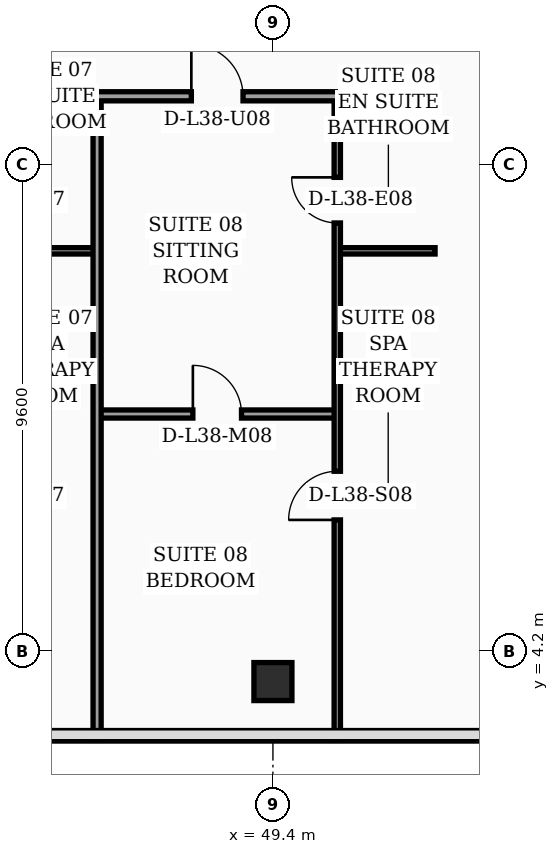
"""IFC4 building model, lengths in metres.
Left out: names, types, materials, properties, quantities, classifications, styles, units other than length and angle.
Written with IfcOpenShell. Run it as: python <this file> out.ifc"""

import sys

from ifc_helpers import new_model, si_unit, direction, frame, frame_2d, origin, origin_2d, place, context, subcontext, project, spatial, rectangle, hollow_rectangle, extrude, element, fill, save


model = new_model("IFC4")
c1 = context("Model", 3, precision=1e-05, world=origin(), true_north=direction((0.0, 1.0)))
c2 = subcontext(c1, "Body", "Model", "MODEL_VIEW")
j1 = project(units=[si_unit("LENGTHUNIT", "METRE"), si_unit("PLANEANGLEUNIT", "RADIAN")], contexts=[c1])
p1 = place(None, origin())
s1 = spatial("IfcSite", under=j1, at=p1, CompositionType="ELEMENT")
p2 = place(p1, origin())
s2 = spatial("IfcBuilding", under=s1, at=p2, CompositionType="ELEMENT")
p3 = place(p2, frame((0.0, 0.0, 156.1)))
s3 = spatial("IfcBuildingStorey", under=s2, at=p3, CompositionType="ELEMENT", Elevation=156.1)
p4 = place(p3, frame((49.4, 3.6, 0.0), z_axis=(0.0, 0.0, 1.0), x_axis=(1.0, 0.0, 0.0)))
e1 = element("IfcColumn", 1, at=p4, inside=s3, PredefinedType="COLUMN", context=c2, shape_type="SweptSolid", body=[
    extrude(hollow_rectangle(XDim=0.75, YDim=0.75, WallThickness=0.032, at=origin_2d()), origin(), (0.0, 0.0, 1.0), 3.56),
])
p5 = place(p3, frame((59.23, 5.505, 0.0), z_axis=(0.0, 0.0, 1.0), x_axis=(-0.300509063924, 0.953778958931, 0.0)))
e2 = element("IfcWall", 2, at=p5, inside=s3, PredefinedType="SOLIDWALL", context=c2, shape_type="SweptSolid", body=[
    extrude(rectangle(XDim=30.814, YDim=0.32, at=frame_2d((15.407, 0.0))), origin(), (0.0, 0.0, 1.0), 3.56),
])
p6 = place(p5, frame((10.199, 0.0, 0.0)))
e3 = element("IfcOpeningElement", 3, at=p6, cuts=e2, PredefinedType="OPENING", context=c2, shape_type="SweptSolid", body=[
    extrude(rectangle(XDim=1.4, YDim=2.25, at=frame_2d((0.7, 1.125))), frame((0.0, 0.17, 0.0), z_axis=(0.0, -1.0, 0.0), x_axis=(1.0, 0.0, 0.0)), (0.0, 0.0, 1.0), 0.34),
])
p7 = place(p5, frame((1.6, 0.0, 0.75)))
e4 = element("IfcOpeningElement", 4, at=p7, cuts=e2, PredefinedType="OPENING", context=c2, shape_type="SweptSolid", body=[
    extrude(rectangle(XDim=1.5, YDim=1.6, at=frame_2d((0.75, 0.8))), frame((0.0, 0.17, 0.0), z_axis=(0.0, -1.0, 0.0), x_axis=(1.0, 0.0, 0.0)), (0.0, 0.0, 1.0), 0.34),
])
p8 = place(p5, frame((4.7, 0.0, 0.75)))
e5 = element("IfcOpeningElement", 5, at=p8, cuts=e2, PredefinedType="OPENING", context=c2, shape_type="SweptSolid", body=[
    extrude(rectangle(XDim=1.5, YDim=1.6, at=frame_2d((0.75, 0.8))), frame((0.0, 0.17, 0.0), z_axis=(0.0, -1.0, 0.0), x_axis=(1.0, 0.0, 0.0)), (0.0, 0.0, 1.0), 0.34),
])
p9 = place(p5, frame((7.8, 0.0, 0.75)))
e6 = element("IfcOpeningElement", 6, at=p9, cuts=e2, PredefinedType="OPENING", context=c2, shape_type="SweptSolid", body=[
    extrude(rectangle(XDim=1.5, YDim=1.6, at=frame_2d((0.75, 0.8))), frame((0.0, 0.17, 0.0), z_axis=(0.0, -1.0, 0.0), x_axis=(1.0, 0.0, 0.0)), (0.0, 0.0, 1.0), 0.34),
])
p10 = place(p5, frame((14.0, 0.0, 0.75)))
e7 = element("IfcOpeningElement", 7, at=p10, cuts=e2, PredefinedType="OPENING", context=c2, shape_type="SweptSolid", body=[
    extrude(rectangle(XDim=1.5, YDim=1.6, at=frame_2d((0.75, 0.8))), frame((0.0, 0.17, 0.0), z_axis=(0.0, -1.0, 0.0), x_axis=(1.0, 0.0, 0.0)), (0.0, 0.0, 1.0), 0.34),
])
p11 = place(p5, frame((17.1, 0.0, 0.75)))
e8 = element("IfcOpeningElement", 8, at=p11, cuts=e2, PredefinedType="OPENING", context=c2, shape_type="SweptSolid", body=[
    extrude(rectangle(XDim=1.5, YDim=1.6, at=frame_2d((0.75, 0.8))), frame((0.0, 0.17, 0.0), z_axis=(0.0, -1.0, 0.0), x_axis=(1.0, 0.0, 0.0)), (0.0, 0.0, 1.0), 0.34),
])
p12 = place(p5, frame((20.2, 0.0, 0.75)))
e9 = element("IfcOpeningElement", 9, at=p12, cuts=e2, PredefinedType="OPENING", context=c2, shape_type="SweptSolid", body=[
    extrude(rectangle(XDim=1.5, YDim=1.6, at=frame_2d((0.75, 0.8))), frame((0.0, 0.17, 0.0), z_axis=(0.0, -1.0, 0.0), x_axis=(1.0, 0.0, 0.0)), (0.0, 0.0, 1.0), 0.34),
])
p13 = place(p5, frame((23.3, 0.0, 0.75)))
e10 = element("IfcOpeningElement", 10, at=p13, cuts=e2, PredefinedType="OPENING", context=c2, shape_type="SweptSolid", body=[
    extrude(rectangle(XDim=1.5, YDim=1.6, at=frame_2d((0.75, 0.8))), frame((0.0, 0.17, 0.0), z_axis=(0.0, -1.0, 0.0), x_axis=(1.0, 0.0, 0.0)), (0.0, 0.0, 1.0), 0.34),
])
p14 = place(p5, frame((26.4, 0.0, 0.75)))
e11 = element("IfcOpeningElement", 11, at=p14, cuts=e2, PredefinedType="OPENING", context=c2, shape_type="SweptSolid", body=[
    extrude(rectangle(XDim=1.5, YDim=1.6, at=frame_2d((0.75, 0.8))), frame((0.0, 0.17, 0.0), z_axis=(0.0, -1.0, 0.0), x_axis=(1.0, 0.0, 0.0)), (0.0, 0.0, 1.0), 0.34),
])
p15 = place(p3, frame((43.8, 12.1, 0.0), z_axis=(0.0, 0.0, 1.0), x_axis=(1.0, 0.0, 0.0)))
e12 = element("IfcWall", 12, at=p15, inside=s3, PredefinedType="PARTITIONING", context=c2, shape_type="SweptSolid", body=[
    extrude(rectangle(XDim=2.13, YDim=0.125, at=frame_2d((1.065, 0.0))), origin(), (0.0, 0.0, 1.0), 3.56),
])
p16 = place(p3, frame((50.67, 12.1, 0.0), z_axis=(0.0, 0.0, 1.0), x_axis=(1.0, 0.0, 0.0)))
e13 = element("IfcWall", 13, at=p16, inside=s3, PredefinedType="PARTITIONING", context=c2, shape_type="SweptSolid", body=[
    extrude(rectangle(XDim=1.93, YDim=0.125, at=frame_2d((0.965, 0.0))), origin(), (0.0, 0.0, 1.0), 3.56),
])
p17 = place(p3, frame((45.93, 8.88, 0.0), z_axis=(0.0, 0.0, 1.0), x_axis=(1.0, 0.0, 0.0)))
e14 = element("IfcWall", 14, at=p17, inside=s3, PredefinedType="PARTITIONING", context=c2, shape_type="SweptSolid", body=[
    extrude(rectangle(XDim=4.74, YDim=0.16, at=frame_2d((2.37, 0.0))), origin(), (0.0, 0.0, 1.0), 2.94),
])
p18 = place(p17, frame((1.89, 0.0, 0.0)))
e15 = element("IfcOpeningElement", 15, at=p18, cuts=e14, PredefinedType="OPENING", context=c2, shape_type="SweptSolid", body=[
    extrude(rectangle(XDim=0.96, YDim=2.2, at=frame_2d((0.48, 1.1))), frame((0.0, 0.09, 0.0), z_axis=(0.0, -1.0, 0.0), x_axis=(1.0, 0.0, 0.0)), (0.0, 0.0, 1.0), 0.18),
])
p19 = place(p3, frame((50.67, 2.44, 0.0), z_axis=(0.0, 0.0, 1.0), x_axis=(0.0, 1.0, 0.0)))
e16 = element("IfcWall", 16, at=p19, inside=s3, PredefinedType="PARTITIONING", context=c2, shape_type="SweptSolid", body=[
    extrude(rectangle(XDim=12.71, YDim=0.125, at=frame_2d((6.355, 0.0))), origin(), (0.0, 0.0, 1.0), 3.04),
])
p20 = place(p19, frame((4.35, 0.0, 0.0)))
e17 = element("IfcOpeningElement", 17, at=p20, cuts=e16, PredefinedType="OPENING", context=c2, shape_type="SweptSolid", body=[
    extrude(rectangle(XDim=0.96, YDim=2.2, at=frame_2d((0.48, 1.1))), frame((0.0, 0.073, 0.0), z_axis=(0.0, -1.0, 0.0), x_axis=(1.0, 0.0, 0.0)), (0.0, 0.0, 1.0), 0.145),
])
p21 = place(p19, frame((10.21, 0.0, 0.0)))
e18 = element("IfcOpeningElement", 18, at=p21, cuts=e16, PredefinedType="OPENING", context=c2, shape_type="SweptSolid", body=[
    extrude(rectangle(XDim=0.9, YDim=2.15, at=frame_2d((0.45, 1.075))), frame((0.0, 0.073, 0.0), z_axis=(0.0, -1.0, 0.0), x_axis=(1.0, 0.0, 0.0)), (0.0, 0.0, 1.0), 0.145),
])
p22 = place(p3, frame((45.93, 2.44, 0.0), z_axis=(0.0, 0.0, 1.0), x_axis=(0.0, 1.0, 0.0)))
e19 = element("IfcWall", 19, at=p22, inside=s3, PredefinedType="PARTITIONING", context=c2, shape_type="SweptSolid", body=[
    extrude(rectangle(XDim=12.71, YDim=0.16, at=frame_2d((6.355, 0.0))), origin(), (0.0, 0.0, 1.0), 3.04),
])
p23 = place(p3, frame((32.4, 15.15, 0.0), z_axis=(0.0, 0.0, 1.0), x_axis=(1.0, 0.0, 0.0)))
e20 = element("IfcWall", 20, at=p23, inside=s3, PredefinedType="PARTITIONING", context=c2, shape_type="SweptSolid", body=[
    extrude(rectangle(XDim=20.2, YDim=0.18, at=frame_2d((10.1, 0.0))), origin(), (0.0, 0.0, 1.0), 2.94),
])
p24 = place(p23, frame((1.64, 0.0, 0.0)))
e21 = element("IfcOpeningElement", 21, at=p24, cuts=e20, PredefinedType="OPENING", context=c2, shape_type="SweptSolid", body=[
    extrude(rectangle(XDim=1.02, YDim=2.2, at=frame_2d((0.51, 1.1))), frame((0.0, 0.1, 0.0), z_axis=(0.0, -1.0, 0.0), x_axis=(1.0, 0.0, 0.0)), (0.0, 0.0, 1.0), 0.2),
])
p25 = place(p23, frame((8.2, 0.0, 0.0)))
e22 = element("IfcOpeningElement", 22, at=p25, cuts=e20, PredefinedType="OPENING", context=c2, shape_type="SweptSolid", body=[
    extrude(rectangle(XDim=1.02, YDim=2.2, at=frame_2d((0.51, 1.1))), frame((0.0, 0.1, 0.0), z_axis=(0.0, -1.0, 0.0), x_axis=(1.0, 0.0, 0.0)), (0.0, 0.0, 1.0), 0.2),
])
p26 = place(p23, frame((15.39, 0.0, 0.0)))
e23 = element("IfcOpeningElement", 23, at=p26, cuts=e20, PredefinedType="OPENING", context=c2, shape_type="SweptSolid", body=[
    extrude(rectangle(XDim=1.02, YDim=2.2, at=frame_2d((0.51, 1.1))), frame((0.0, 0.1, 0.0), z_axis=(0.0, -1.0, 0.0), x_axis=(1.0, 0.0, 0.0)), (0.0, 0.0, 1.0), 0.2),
])
p27 = place(p18, origin())
e24 = element("IfcDoor", 24, at=p27, inside=s3, OperationType="SINGLE_SWING_LEFT", PredefinedType="DOOR", context=c2, shape_type="SweptSolid", body=[
    extrude(rectangle(XDim=0.96, YDim=2.2, at=frame_2d((0.48, 1.1))), frame((0.0, 0.025, 0.0), z_axis=(0.0, -1.0, 0.0), x_axis=(1.0, 0.0, 0.0)), (0.0, 0.0, 1.0), 0.05),
])
fill(e15, e24)
p28 = place(p20, origin())
e25 = element("IfcDoor", 25, at=p28, inside=s3, OperationType="SINGLE_SWING_LEFT", PredefinedType="DOOR", context=c2, shape_type="SweptSolid", body=[
    extrude(rectangle(XDim=0.96, YDim=2.2, at=frame_2d((0.48, 1.1))), frame((0.0, 0.025, 0.0), z_axis=(0.0, -1.0, 0.0), x_axis=(1.0, 0.0, 0.0)), (0.0, 0.0, 1.0), 0.05),
])
fill(e17, e25)
p29 = place(p21, origin())
e26 = element("IfcDoor", 26, at=p29, inside=s3, OperationType="SINGLE_SWING_RIGHT", PredefinedType="DOOR", context=c2, shape_type="SweptSolid", body=[
    extrude(rectangle(XDim=0.9, YDim=2.15, at=frame_2d((0.45, 1.075))), frame((0.0, 0.025, 0.0), z_axis=(0.0, -1.0, 0.0), x_axis=(1.0, 0.0, 0.0)), (0.0, 0.0, 1.0), 0.05),
])
fill(e18, e26)
p30 = place(p26, origin())
e27 = element("IfcDoor", 27, at=p30, inside=s3, OperationType="SINGLE_SWING_LEFT", PredefinedType="DOOR", context=c2, shape_type="SweptSolid", body=[
    extrude(rectangle(XDim=1.02, YDim=2.2, at=frame_2d((0.51, 1.1))), frame((0.0, 0.025, 0.0), z_axis=(0.0, -1.0, 0.0), x_axis=(1.0, 0.0, 0.0)), (0.0, 0.0, 1.0), 0.05),
])
fill(e23, e27)
save(model, sys.argv[1])
